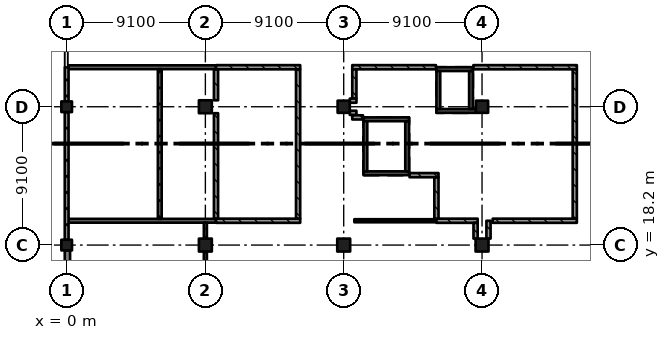
"""IFC4 building model, lengths in metres.
Left out: names, types, materials, properties, quantities, classifications, styles, units other than length and angle.
Written with IfcOpenShell. Run it as: python <this file> out.ifc"""

import sys

from ifc_helpers import new_model, si_unit, direction, frame, frame_2d, origin, origin_2d, place, context, subcontext, project, spatial, rectangle, extrude, element, fill, save


model = new_model("IFC4")
c1 = context("Model", 3, precision=1e-05, world=origin(), true_north=direction((0.0, 1.0)))
c2 = subcontext(c1, "Body", "Model", "MODEL_VIEW")
j1 = project(units=[si_unit("LENGTHUNIT", "METRE"), si_unit("PLANEANGLEUNIT", "RADIAN")], contexts=[c1])
p1 = place(None, origin())
s1 = spatial("IfcSite", under=j1, at=p1, CompositionType="ELEMENT")
p2 = place(p1, origin())
s2 = spatial("IfcBuilding", under=s1, at=p2, CompositionType="ELEMENT")
p3 = place(p2, frame((0.0, 0.0, 6.37)))
s3 = spatial("IfcBuildingStorey", under=s2, at=p3, CompositionType="ELEMENT", Elevation=6.37)
for number, where, z_axis, x_axis in (
    (1, (-0.025, 18.2, 0.0), (0.0, 0.0, 1.0), (1.0, 0.0, 0.0)),
    (2, (-0.025, 27.3, 0.0), (0.0, 0.0, 1.0), (1.0, 0.0, 0.0)),
):
    element("IfcColumn", number, at=place(p3, frame(where, z_axis=z_axis, x_axis=x_axis)), inside=s3, PredefinedType="COLUMN", context=c2, shape_type="SweptSolid", body=[
        extrude(rectangle(XDim=0.7, YDim=0.7, at=origin_2d()), origin(), (0.0, 0.0, 1.0), 4.55),
    ])
for number, where, z_axis, x_axis in (
    (3, (9.1, 18.2, 0.0), (0.0, 0.0, 1.0), (1.0, 0.0, 0.0)),
    (4, (9.1, 27.3, 0.0), (0.0, 0.0, 1.0), (1.0, 0.0, 0.0)),
    (5, (18.2, 18.2, 0.0), (0.0, 0.0, 1.0), (1.0, 0.0, 0.0)),
):
    element("IfcColumn", number, at=place(p3, frame(where, z_axis=z_axis, x_axis=x_axis)), inside=s3, PredefinedType="COLUMN", context=c2, shape_type="SweptSolid", body=[
        extrude(rectangle(XDim=0.85, YDim=0.85, at=origin_2d()), origin(), (0.0, 0.0, 1.0), 4.55),
    ])
p4 = place(p3, frame((18.2, 27.3, 0.0), z_axis=(0.0, 0.0, 1.0), x_axis=(1.0, 0.0, 0.0)))
e6 = element("IfcColumn", 6, at=p4, inside=s3, PredefinedType="COLUMN", context=c2, shape_type="SweptSolid", body=[
    extrude(rectangle(XDim=0.8, YDim=0.8, at=origin_2d()), origin(), (0.0, 0.0, 1.0), 4.55),
])
p5 = place(p3, frame((27.3, 18.2, 0.0), z_axis=(0.0, 0.0, 1.0), x_axis=(1.0, 0.0, 0.0)))
e7 = element("IfcColumn", 7, at=p5, inside=s3, PredefinedType="COLUMN", context=c2, shape_type="SweptSolid", body=[
    extrude(rectangle(XDim=0.85, YDim=0.85, at=origin_2d()), origin(), (0.0, 0.0, 1.0), 4.55),
])
p6 = place(p3, frame((27.3, 27.3, 0.0), z_axis=(0.0, 0.0, 1.0), x_axis=(1.0, 0.0, 0.0)))
e8 = element("IfcColumn", 8, at=p6, inside=s3, PredefinedType="COLUMN", context=c2, shape_type="SweptSolid", body=[
    extrude(rectangle(XDim=0.8, YDim=0.8, at=origin_2d()), origin(), (0.0, 0.0, 1.0), 4.55),
])
p7 = place(p3, frame((26.9, 27.025, 0.0), z_axis=(0.0, 0.0, 1.0), x_axis=(-1.0, 0.0, 0.0)))
e9 = element("IfcWall", 9, at=p7, inside=s3, PredefinedType="SHEAR", context=c2, shape_type="SweptSolid", body=[
    extrude(rectangle(XDim=2.6, YDim=0.25, at=frame_2d((1.3, 0.0))), origin(), (0.0, 0.0, 1.0), 4.55),
])
p8 = place(p3, frame((26.7, 29.775, 0.0), z_axis=(0.0, 0.0, 1.0), x_axis=(-1.0, 0.0, 0.0)))
e10 = element("IfcWall", 10, at=p8, inside=s3, PredefinedType="SHEAR", context=c2, shape_type="SweptSolid", body=[
    extrude(rectangle(XDim=2.4, YDim=0.25, at=frame_2d((1.2, 0.0))), origin(), (0.0, 0.0, 1.0), 4.55),
])
p9 = place(p3, frame((24.425, 29.65, 0.0), z_axis=(0.0, 0.0, 1.0), x_axis=(0.0, -1.0, 0.0)))
e11 = element("IfcWall", 11, at=p9, inside=s3, PredefinedType="SHEAR", context=c2, shape_type="SweptSolid", body=[
    extrude(rectangle(XDim=2.5, YDim=0.25, at=frame_2d((1.25, 0.0))), origin(), (0.0, 0.0, 1.0), 4.55),
])
p10 = place(p9, frame((0.9, 0.0, 0.0)))
e12 = element("IfcOpeningElement", 12, at=p10, cuts=e11, PredefinedType="OPENING", context=c2, shape_type="SweptSolid", body=[
    extrude(rectangle(XDim=0.7, YDim=2.1, at=frame_2d((0.35, 1.05))), frame((0.0, 0.135, 0.0), z_axis=(0.0, -1.0, 0.0), x_axis=(1.0, 0.0, 0.0)), (0.0, 0.0, 1.0), 0.27),
])
p11 = place(p3, frame((26.575, 29.65, 0.0), z_axis=(0.0, 0.0, 1.0), x_axis=(0.0, -1.0, 0.0)))
e13 = element("IfcWall", 13, at=p11, inside=s3, PredefinedType="SHEAR", context=c2, shape_type="SweptSolid", body=[
    extrude(rectangle(XDim=2.5, YDim=0.25, at=frame_2d((1.25, 0.0))), origin(), (0.0, 0.0, 1.0), 4.55),
])
p12 = place(p3, frame((22.5, 22.925, 0.0), z_axis=(0.0, 0.0, 1.0), x_axis=(-1.0, 0.0, 0.0)))
e14 = element("IfcWall", 14, at=p12, inside=s3, PredefinedType="SHEAR", context=c2, shape_type="SweptSolid", body=[
    extrude(rectangle(XDim=3.0, YDim=0.25, at=frame_2d((1.5, 0.0))), origin(), (0.0, 0.0, 1.0), 4.55),
])
p13 = place(p12, frame((0.95, 0.0, 0.0)))
e15 = element("IfcOpeningElement", 15, at=p13, cuts=e14, PredefinedType="OPENING", context=c2, shape_type="SweptSolid", body=[
    extrude(rectangle(XDim=1.1, YDim=2.1, at=frame_2d((0.55, 1.05))), frame((0.0, 0.135, 0.0), z_axis=(0.0, -1.0, 0.0), x_axis=(1.0, 0.0, 0.0)), (0.0, 0.0, 1.0), 0.27),
])
p14 = place(p3, frame((22.5, 26.475, 0.0), z_axis=(0.0, 0.0, 1.0), x_axis=(-1.0, 0.0, 0.0)))
e16 = element("IfcWall", 16, at=p14, inside=s3, PredefinedType="SHEAR", context=c2, shape_type="SweptSolid", body=[
    extrude(rectangle(XDim=3.0, YDim=0.25, at=frame_2d((1.5, 0.0))), origin(), (0.0, 0.0, 1.0), 4.55),
])
for number, where, z_axis, x_axis in (
    (17, (19.625, 26.35, 0.0), (0.0, 0.0, 1.0), (0.0, -1.0, 0.0)),
    (18, (22.375, 26.35, 0.0), (0.0, 0.0, 1.0), (0.0, -1.0, 0.0)),
):
    element("IfcWall", number, at=place(p3, frame(where, z_axis=z_axis, x_axis=x_axis)), inside=s3, PredefinedType="SHEAR", context=c2, shape_type="SweptSolid", body=[
        extrude(rectangle(XDim=3.3, YDim=0.25, at=frame_2d((1.65, 0.0))), origin(), (0.0, 0.0, 1.0), 4.55),
    ])
p15 = place(p3, frame((-0.025, 29.9, 0.0), z_axis=(0.0, 0.0, 1.0), x_axis=(0.0, -1.0, 0.0)))
e19 = element("IfcWall", 19, at=p15, inside=s3, PredefinedType="SOLIDWALL", context=c2, shape_type="SweptSolid", body=[
    extrude(rectangle(XDim=2.25, YDim=0.25, at=frame_2d((1.125, 0.0))), origin(), (0.0, 0.0, 1.0), 3.5),
])
p16 = place(p3, frame((-0.025, 26.95, 0.0), z_axis=(0.0, 0.0, 1.0), x_axis=(0.0, -1.0, 0.0)))
e20 = element("IfcWall", 20, at=p16, inside=s3, PredefinedType="SOLIDWALL", context=c2, shape_type="SweptSolid", body=[
    extrude(rectangle(XDim=8.4, YDim=0.25, at=frame_2d((4.2, 0.0))), origin(), (0.0, 0.0, 1.0), 3.55),
])
p17 = place(p3, frame((0.025, 17.85, 0.0), z_axis=(0.0, 0.0, 1.0), x_axis=(0.0, -1.0, 0.0)))
e21 = element("IfcWall", 21, at=p17, inside=s3, PredefinedType="SOLIDWALL", context=c2, shape_type="SweptSolid", body=[
    extrude(rectangle(XDim=8.475, YDim=0.35, at=frame_2d((4.238, 0.0))), origin(), (0.0, 0.0, 1.0), 3.5),
])
p18 = place(p3, frame((0.1, 19.8, 0.0), z_axis=(0.0, 0.0, 1.0), x_axis=(1.0, 0.0, 0.0)))
e22 = element("IfcWall", 22, at=p18, inside=s3, PredefinedType="SOLIDWALL", context=c2, shape_type="SweptSolid", body=[
    extrude(rectangle(XDim=9.7, YDim=0.25, at=frame_2d((4.85, 0.0))), origin(), (0.0, 0.0, 1.0), 4.25),
])
p19 = place(p18, frame((7.05, 0.0, 0.0)))
e23 = element("IfcOpeningElement", 23, at=p19, cuts=e22, PredefinedType="OPENING", context=c2, shape_type="SweptSolid", body=[
    extrude(rectangle(XDim=1.0, YDim=2.1, at=frame_2d((0.5, 1.05))), frame((0.0, 0.135, 0.0), z_axis=(0.0, -1.0, 0.0), x_axis=(1.0, 0.0, 0.0)), (0.0, 0.0, 1.0), 0.27),
])
p20 = place(p18, frame((2.75, 0.0, 0.0)))
e24 = element("IfcOpeningElement", 24, at=p20, cuts=e22, PredefinedType="OPENING", context=c2, shape_type="SweptSolid", body=[
    extrude(rectangle(XDim=1.0, YDim=2.1, at=frame_2d((0.5, 1.05))), frame((0.0, 0.135, 0.0), z_axis=(0.0, -1.0, 0.0), x_axis=(1.0, 0.0, 0.0)), (0.0, 0.0, 1.0), 0.27),
])
p21 = place(p3, frame((0.1, 29.9, 0.0), z_axis=(0.0, 0.0, 1.0), x_axis=(1.0, 0.0, 0.0)))
e25 = element("IfcWall", 25, at=p21, inside=s3, PredefinedType="SOLIDWALL", context=c2, shape_type="SweptSolid", body=[
    extrude(rectangle(XDim=9.7, YDim=0.25, at=frame_2d((4.85, 0.0))), origin(), (0.0, 0.0, 1.0), 4.25),
])
p22 = place(p3, frame((6.1, 29.775, 0.0), z_axis=(0.0, 0.0, 1.0), x_axis=(0.0, -1.0, 0.0)))
e26 = element("IfcWall", 26, at=p22, inside=s3, PredefinedType="SOLIDWALL", context=c2, shape_type="SweptSolid", body=[
    extrude(rectangle(XDim=9.85, YDim=0.25, at=frame_2d((4.925, 0.0))), origin(), (0.0, 0.0, 1.0), 4.25),
])
p23 = place(p3, frame((9.1, 17.775, 0.0), z_axis=(0.0, 0.0, 1.0), x_axis=(0.0, -1.0, 0.0)))
e27 = element("IfcWall", 27, at=p23, inside=s3, PredefinedType="PARTITIONING", context=c2, shape_type="SweptSolid", body=[
    extrude(rectangle(XDim=6.837, YDim=0.2, at=frame_2d((3.419, 0.0))), origin(), (0.0, 0.0, 1.0), 3.55),
])
p24 = place(p23, frame((0.85, 0.0, 0.0)))
e28 = element("IfcOpeningElement", 28, at=p24, cuts=e27, PredefinedType="OPENING", context=c2, shape_type="SweptSolid", body=[
    extrude(rectangle(XDim=1.8, YDim=2.4, at=frame_2d((0.9, 1.2))), frame((0.0, 0.11, 0.0), z_axis=(0.0, -1.0, 0.0), x_axis=(1.0, 0.0, 0.0)), (0.0, 0.0, 1.0), 0.22),
])
p25 = place(p23, frame((4.25, 0.0, 0.0)))
e29 = element("IfcOpeningElement", 29, at=p25, cuts=e27, PredefinedType="OPENING", context=c2, shape_type="SweptSolid", body=[
    extrude(rectangle(XDim=1.8, YDim=2.4, at=frame_2d((0.9, 1.2))), frame((0.0, 0.11, 0.0), z_axis=(0.0, -1.0, 0.0), x_axis=(1.0, 0.0, 0.0)), (0.0, 0.0, 1.0), 0.22),
])
p26 = place(p3, frame((9.1, 19.675, 0.0), z_axis=(0.0, 0.0, 1.0), x_axis=(0.0, -1.0, 0.0)))
e30 = element("IfcWall", 30, at=p26, inside=s3, PredefinedType="PARTITIONING", context=c2, shape_type="SweptSolid", body=[
    extrude(rectangle(XDim=1.05, YDim=0.2, at=frame_2d((0.525, 0.0))), origin(), (0.0, 0.0, 1.0), 3.55),
])
p27 = place(p3, frame((9.8, 19.8, 0.0), z_axis=(0.0, 0.0, 1.0), x_axis=(1.0, 0.0, 0.0)))
e31 = element("IfcWall", 31, at=p27, inside=s3, PredefinedType="SOLIDWALL", context=c2, shape_type="SweptSolid", body=[
    extrude(rectangle(XDim=5.537, YDim=0.275, at=frame_2d((2.769, 0.0))), origin(), (0.0, 0.0, 1.0), 4.25),
])
p28 = place(p27, frame((2.15, 0.0, 0.0)))
e32 = element("IfcOpeningElement", 32, at=p28, cuts=e31, PredefinedType="OPENING", context=c2, shape_type="SweptSolid", body=[
    extrude(rectangle(XDim=1.2, YDim=2.4, at=frame_2d((0.6, 1.2))), frame((0.0, 0.147, 0.0), z_axis=(0.0, -1.0, 0.0), x_axis=(1.0, 0.0, 0.0)), (0.0, 0.0, 1.0), 0.295),
])
p29 = place(p3, frame((9.8, 19.938, 0.0), z_axis=(0.0, 0.0, 1.0), x_axis=(0.0, 1.0, 0.0)))
e33 = element("IfcWall", 33, at=p29, inside=s3, PredefinedType="SOLIDWALL", context=c2, shape_type="SweptSolid", body=[
    extrude(rectangle(XDim=6.938, YDim=0.275, at=frame_2d((3.469, 0.0))), origin(), (0.0, 0.0, 1.0), 4.25),
])
p30 = place(p3, frame((9.8, 27.725, 0.0), z_axis=(0.0, 0.0, 1.0), x_axis=(0.0, 1.0, 0.0)))
e34 = element("IfcWall", 34, at=p30, inside=s3, PredefinedType="SOLIDWALL", context=c2, shape_type="SweptSolid", body=[
    extrude(rectangle(XDim=2.037, YDim=0.275, at=frame_2d((1.019, 0.0))), origin(), (0.0, 0.0, 1.0), 4.25),
])
p31 = place(p3, frame((9.8, 29.9, 0.0), z_axis=(0.0, 0.0, 1.0), x_axis=(1.0, 0.0, 0.0)))
e35 = element("IfcWall", 35, at=p31, inside=s3, PredefinedType="SOLIDWALL", context=c2, shape_type="SweptSolid", body=[
    extrude(rectangle(XDim=5.537, YDim=0.275, at=frame_2d((2.769, 0.0))), origin(), (0.0, 0.0, 1.0), 4.25),
])
p32 = place(p3, frame((15.2, 29.762, 0.0), z_axis=(0.0, 0.0, 1.0), x_axis=(0.0, -1.0, 0.0)))
e36 = element("IfcWall", 36, at=p32, inside=s3, PredefinedType="SOLIDWALL", context=c2, shape_type="SweptSolid", body=[
    extrude(rectangle(XDim=9.825, YDim=0.275, at=frame_2d((4.913, 0.0))), origin(), (0.0, 0.0, 1.0), 4.25),
])
p33 = place(p3, frame((18.6, 26.9, 0.0), z_axis=(0.0, 0.0, 1.0), x_axis=(1.0, 0.0, 0.0)))
e37 = element("IfcWall", 37, at=p33, inside=s3, PredefinedType="SOLIDWALL", context=c2, shape_type="SweptSolid", body=[
    extrude(rectangle(XDim=0.438, YDim=0.275, at=frame_2d((0.219, 0.0))), origin(), (0.0, 0.0, 1.0), 4.25),
])
p34 = place(p3, frame((18.762, 29.9, 0.0), z_axis=(0.0, 0.0, 1.0), x_axis=(1.0, 0.0, 0.0)))
e38 = element("IfcWall", 38, at=p34, inside=s3, PredefinedType="SOLIDWALL", context=c2, shape_type="SweptSolid", body=[
    extrude(rectangle(XDim=5.508, YDim=0.275, at=frame_2d((2.754, 0.0))), origin(), (0.0, 0.0, 1.0), 4.25),
])
p35 = place(p3, frame((18.9, 19.8, 0.0), z_axis=(0.0, 0.0, 1.0), x_axis=(1.0, 0.0, 0.0)))
e39 = element("IfcWall", 39, at=p35, inside=s3, PredefinedType="PARTITIONING", context=c2, shape_type="SweptSolid", body=[
    extrude(rectangle(XDim=5.4, YDim=0.2, at=frame_2d((2.7, 0.0))), origin(), (0.0, 0.0, 1.0), 4.25),
])
p36 = place(p35, frame((1.85, 0.0, 0.0)))
e40 = element("IfcOpeningElement", 40, at=p36, cuts=e39, PredefinedType="OPENING", context=c2, shape_type="SweptSolid", body=[
    extrude(rectangle(XDim=1.8, YDim=2.4, at=frame_2d((0.9, 1.2))), frame((0.0, 0.11, 0.0), z_axis=(0.0, -1.0, 0.0), x_axis=(1.0, 0.0, 0.0)), (0.0, 0.0, 1.0), 0.22),
])
p37 = place(p3, frame((18.9, 29.762, 0.0), z_axis=(0.0, 0.0, 1.0), x_axis=(0.0, -1.0, 0.0)))
e41 = element("IfcWall", 41, at=p37, inside=s3, PredefinedType="SOLIDWALL", context=c2, shape_type="SweptSolid", body=[
    extrude(rectangle(XDim=1.925, YDim=0.275, at=frame_2d((0.962, 0.0))), origin(), (0.0, 0.0, 1.0), 4.25),
])
p38 = place(p3, frame((19.038, 27.7, 0.0), z_axis=(0.0, 0.0, 1.0), x_axis=(-1.0, 0.0, 0.0)))
e42 = element("IfcWall", 42, at=p38, inside=s3, PredefinedType="SOLIDWALL", context=c2, shape_type="SweptSolid", body=[
    extrude(rectangle(XDim=0.438, YDim=0.275, at=frame_2d((0.219, 0.0))), origin(), (0.0, 0.0, 1.0), 4.25),
])
p39 = place(p3, frame((19.47, 26.6, 0.0), z_axis=(0.0, 0.0, 1.0), x_axis=(-1.0, 0.0, 0.0)))
e43 = element("IfcWall", 43, at=p39, inside=s3, PredefinedType="SOLIDWALL", context=c2, shape_type="SweptSolid", body=[
    extrude(rectangle(XDim=0.708, YDim=0.275, at=frame_2d((0.354, 0.0))), origin(), (0.0, 0.0, 1.0), 4.25),
])
p40 = place(p3, frame((24.3, 19.8, 0.0), z_axis=(0.0, 0.0, 1.0), x_axis=(1.0, 0.0, 0.0)))
e44 = element("IfcWall", 44, at=p40, inside=s3, PredefinedType="SOLIDWALL", context=c2, shape_type="SweptSolid", body=[
    extrude(rectangle(XDim=2.712, YDim=0.275, at=frame_2d((1.356, 0.0))), origin(), (0.0, 0.0, 1.0), 4.25),
])
p41 = place(p3, frame((24.3, 19.938, 0.0), z_axis=(0.0, 0.0, 1.0), x_axis=(0.0, 1.0, 0.0)))
e45 = element("IfcWall", 45, at=p41, inside=s3, PredefinedType="SOLIDWALL", context=c2, shape_type="SweptSolid", body=[
    extrude(rectangle(XDim=2.725, YDim=0.275, at=frame_2d((1.363, 0.0))), origin(), (0.0, 0.0, 1.0), 4.25),
])
p42 = place(p3, frame((24.438, 22.8, 0.0), z_axis=(0.0, 0.0, 1.0), x_axis=(-1.0, 0.0, 0.0)))
e46 = element("IfcWall", 46, at=p42, inside=s3, PredefinedType="SOLIDWALL", context=c2, shape_type="SweptSolid", body=[
    extrude(rectangle(XDim=1.907, YDim=0.275, at=frame_2d((0.954, 0.0))), origin(), (0.0, 0.0, 1.0), 4.25),
])
p43 = place(p3, frame((26.73, 29.9, 0.0), z_axis=(0.0, 0.0, 1.0), x_axis=(1.0, 0.0, 0.0)))
e47 = element("IfcWall", 47, at=p43, inside=s3, PredefinedType="SOLIDWALL", context=c2, shape_type="SweptSolid", body=[
    extrude(rectangle(XDim=6.808, YDim=0.275, at=frame_2d((3.404, 0.0))), origin(), (0.0, 0.0, 1.0), 4.25),
])
p44 = place(p3, frame((26.875, 19.663, 0.0), z_axis=(0.0, 0.0, 1.0), x_axis=(0.0, -1.0, 0.0)))
e48 = element("IfcWall", 48, at=p44, inside=s3, PredefinedType="SOLIDWALL", context=c2, shape_type="SweptSolid", body=[
    extrude(rectangle(XDim=1.038, YDim=0.275, at=frame_2d((0.519, 0.0))), origin(), (0.0, 0.0, 1.0), 4.25),
])
p45 = place(p3, frame((27.725, 18.625, 0.0), z_axis=(0.0, 0.0, 1.0), x_axis=(0.0, 1.0, 0.0)))
e49 = element("IfcWall", 49, at=p45, inside=s3, PredefinedType="SOLIDWALL", context=c2, shape_type="SweptSolid", body=[
    extrude(rectangle(XDim=1.175, YDim=0.275, at=frame_2d((0.587, 0.0))), origin(), (0.0, 0.0, 1.0), 4.25),
])
p46 = place(p3, frame((28.0, 19.8, 0.0), z_axis=(0.0, 0.0, 1.0), x_axis=(1.0, 0.0, 0.0)))
e50 = element("IfcWall", 50, at=p46, inside=s3, PredefinedType="SOLIDWALL", context=c2, shape_type="SweptSolid", body=[
    extrude(rectangle(XDim=5.538, YDim=0.275, at=frame_2d((2.769, 0.0))), origin(), (0.0, 0.0, 1.0), 4.25),
])
p47 = place(p46, frame((2.15, 0.0, 0.0)))
e51 = element("IfcOpeningElement", 51, at=p47, cuts=e50, PredefinedType="OPENING", context=c2, shape_type="SweptSolid", body=[
    extrude(rectangle(XDim=1.2, YDim=2.4, at=frame_2d((0.6, 1.2))), frame((0.0, 0.147, 0.0), z_axis=(0.0, -1.0, 0.0), x_axis=(1.0, 0.0, 0.0)), (0.0, 0.0, 1.0), 0.295),
])
p48 = place(p3, frame((33.4, 29.762, 0.0), z_axis=(0.0, 0.0, 1.0), x_axis=(0.0, -1.0, 0.0)))
e52 = element("IfcWall", 52, at=p48, inside=s3, PredefinedType="SOLIDWALL", context=c2, shape_type="SweptSolid", body=[
    extrude(rectangle(XDim=9.825, YDim=0.275, at=frame_2d((4.913, 0.0))), origin(), (0.0, 0.0, 1.0), 4.25),
])
p49 = place(p19, origin())
e53 = element("IfcDoor", 53, at=p49, inside=s3, OperationType="SINGLE_SWING_LEFT", PredefinedType="DOOR", context=c2, shape_type="SweptSolid", body=[
    extrude(rectangle(XDim=1.0, YDim=2.1, at=frame_2d((0.5, 1.05))), frame((0.0, 0.025, 0.0), z_axis=(0.0, -1.0, 0.0), x_axis=(1.0, 0.0, 0.0)), (0.0, 0.0, 1.0), 0.05),
])
fill(e23, e53)
p50 = place(p47, origin())
e54 = element("IfcDoor", 54, at=p50, inside=s3, OperationType="SINGLE_SWING_RIGHT", PredefinedType="DOOR", context=c2, shape_type="SweptSolid", body=[
    extrude(rectangle(XDim=1.2, YDim=2.4, at=frame_2d((0.6, 1.2))), frame((0.0, 0.025, 0.0), z_axis=(0.0, -1.0, 0.0), x_axis=(1.0, 0.0, 0.0)), (0.0, 0.0, 1.0), 0.05),
])
fill(e51, e54)
p51 = place(p20, origin())
e55 = element("IfcDoor", 55, at=p51, inside=s3, OperationType="SINGLE_SWING_RIGHT", PredefinedType="DOOR", context=c2, shape_type="SweptSolid", body=[
    extrude(rectangle(XDim=1.0, YDim=2.1, at=frame_2d((0.5, 1.05))), frame((0.0, 0.025, 0.0), z_axis=(0.0, -1.0, 0.0), x_axis=(1.0, 0.0, 0.0)), (0.0, 0.0, 1.0), 0.05),
])
fill(e24, e55)
p52 = place(p28, origin())
e56 = element("IfcDoor", 56, at=p52, inside=s3, OperationType="SINGLE_SWING_RIGHT", PredefinedType="DOOR", context=c2, shape_type="SweptSolid", body=[
    extrude(rectangle(XDim=1.2, YDim=2.4, at=frame_2d((0.6, 1.2))), frame((0.0, 0.025, 0.0), z_axis=(0.0, -1.0, 0.0), x_axis=(1.0, 0.0, 0.0)), (0.0, 0.0, 1.0), 0.05),
])
fill(e32, e56)
p53 = place(p36, origin())
e57 = element("IfcDoor", 57, at=p53, inside=s3, OperationType="DOUBLE_DOOR_SINGLE_SWING", PredefinedType="DOOR", context=c2, shape_type="SweptSolid", body=[
    extrude(rectangle(XDim=1.8, YDim=2.4, at=frame_2d((0.9, 1.2))), frame((0.0, 0.025, 0.0), z_axis=(0.0, -1.0, 0.0), x_axis=(1.0, 0.0, 0.0)), (0.0, 0.0, 1.0), 0.05),
])
fill(e40, e57)
p54 = place(p10, origin())
e58 = element("IfcDoor", 58, at=p54, inside=s3, OperationType="SINGLE_SWING_LEFT", PredefinedType="DOOR", context=c2, shape_type="SweptSolid", body=[
    extrude(rectangle(XDim=0.7, YDim=2.1, at=frame_2d((0.35, 1.05))), frame((0.0, 0.025, 0.0), z_axis=(0.0, -1.0, 0.0), x_axis=(1.0, 0.0, 0.0)), (0.0, 0.0, 1.0), 0.05),
])
fill(e12, e58)
p55 = place(p13, origin())
e59 = element("IfcDoor", 59, at=p55, inside=s3, OperationType="DOUBLE_DOOR_SLIDING", PredefinedType="DOOR", context=c2, shape_type="SweptSolid", body=[
    extrude(rectangle(XDim=1.1, YDim=2.1, at=frame_2d((0.55, 1.05))), frame((0.0, 0.025, 0.0), z_axis=(0.0, -1.0, 0.0), x_axis=(1.0, 0.0, 0.0)), (0.0, 0.0, 1.0), 0.05),
])
fill(e15, e59)
save(model, sys.argv[1])
